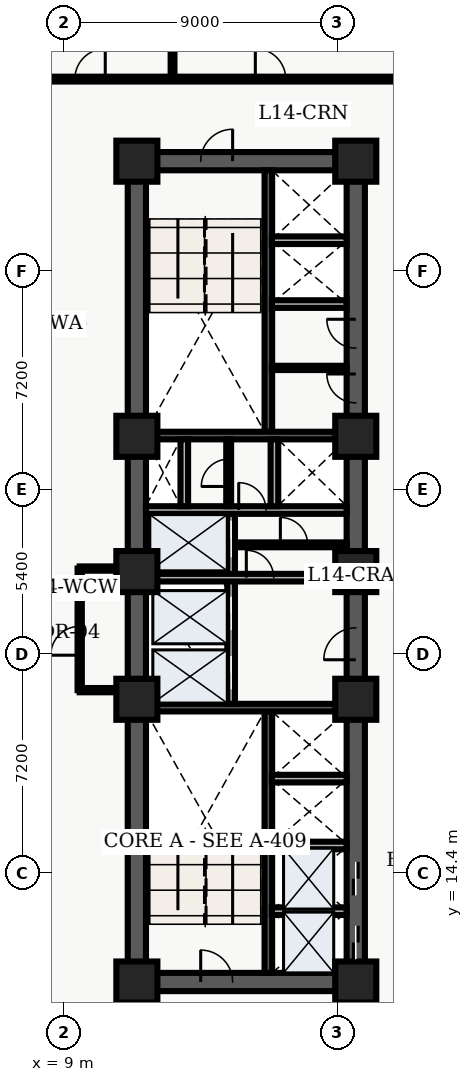
"""IFC4 building model, lengths in metres.
Left out: names, types, materials, properties, quantities, classifications, styles, units other than length and angle.
Written with IfcOpenShell. Run it as: python <this file> out.ifc"""

import sys

from ifc_helpers import new_model, entity, si_unit, converted_unit, direction, frame, origin_with_axes, origin_2d_with_axis, place, context, subcontext, project, spatial, polyline, rectangle, outline, extrude, element, fill, save


model = new_model("IFC4")
c1 = context("Model", 3, precision=1e-05, world=origin_with_axes(), true_north=direction((0.0, 1.0)))
c2 = subcontext(c1, "Body", "Model", "MODEL_VIEW")
j1 = project(units=[si_unit("LENGTHUNIT", "METRE"), converted_unit("PLANEANGLEUNIT", "DEGREE", entity("IfcPlaneAngleMeasure", 0.017), si_unit("PLANEANGLEUNIT", "RADIAN"), dimensions=[0, 0, 0, 0, 0, 0, 0])], contexts=[c1])
p1 = place(None, origin_with_axes())
s1 = spatial("IfcSite", under=j1, at=p1, CompositionType="ELEMENT")
p2 = place(p1, origin_with_axes())
s2 = spatial("IfcBuilding", under=s1, at=p2, CompositionType="ELEMENT")
p3 = place(p2, frame((0.0, 0.0, 60.0), z_axis=(0.0, 0.0, 1.0), x_axis=(1.0, 0.0, 0.0)))
s3 = spatial("IfcBuildingStorey", under=s2, at=p3, CompositionType="ELEMENT", Elevation=60.0)
p4 = place(p3, frame((11.4, 10.8, 0.0), z_axis=(0.0, 0.0, 1.0), x_axis=(0.0, 1.0, 0.0)))
e1 = element("IfcWall", 1, at=p4, inside=s3, PredefinedType="SHEAR", context=c2, shape_type="SweptSolid", body=[
    extrude(outline(polyline([(0.0, -0.3), (27.0, -0.3), (27.0, 0.3), (0.0, 0.3), (0.0, -0.3)])), origin_with_axes(), (0.0, 0.0, 1.0), 3.66),
])
p5 = place(p3, frame((11.4, 10.8, 0.0), z_axis=(0.0, 0.0, 1.0), x_axis=(1.0, 0.0, 0.0)))
e2 = element("IfcWall", 2, at=p5, inside=s3, PredefinedType="SHEAR", context=c2, shape_type="SweptSolid", body=[
    extrude(outline(polyline([(0.0, -0.3), (7.2, -0.3), (7.2, 0.3), (0.0, 0.3), (0.0, -0.3)])), origin_with_axes(), (0.0, 0.0, 1.0), 3.66),
])
p6 = place(p5, frame((2.625, 0.0, 0.0), z_axis=(0.0, 0.0, 1.0), x_axis=(1.0, 0.0, 0.0)))
e3 = element("IfcOpeningElement", 3, at=p6, cuts=e2, PredefinedType="OPENING", context=c2, shape_type="SweptSolid", body=[
    extrude(rectangle(XDim=1.05, YDim=0.62, at=origin_2d_with_axis()), origin_with_axes(), (0.0, 0.0, 1.0), 2.15),
])
p7 = place(p3, frame((11.4, 37.8, 0.0), z_axis=(0.0, 0.0, 1.0), x_axis=(1.0, 0.0, 0.0)))
e4 = element("IfcWall", 4, at=p7, inside=s3, PredefinedType="SHEAR", context=c2, shape_type="SweptSolid", body=[
    extrude(outline(polyline([(0.0, -0.3), (7.2, -0.3), (7.2, 0.3), (0.0, 0.3), (0.0, -0.3)])), origin_with_axes(), (0.0, 0.0, 1.0), 3.66),
])
p8 = place(p7, frame((2.625, 0.0, 0.0), z_axis=(0.0, 0.0, 1.0), x_axis=(1.0, 0.0, 0.0)))
e5 = element("IfcOpeningElement", 5, at=p8, cuts=e4, PredefinedType="OPENING", context=c2, shape_type="SweptSolid", body=[
    extrude(rectangle(XDim=1.05, YDim=0.62, at=origin_2d_with_axis()), origin_with_axes(), (0.0, 0.0, 1.0), 2.15),
])
p9 = place(p3, frame((18.6, 10.8, 0.0), z_axis=(0.0, 0.0, 1.0), x_axis=(0.0, 1.0, 0.0)))
e6 = element("IfcWall", 6, at=p9, inside=s3, PredefinedType="SHEAR", context=c2, shape_type="SweptSolid", body=[
    extrude(outline(polyline([(0.0, -0.3), (13.5, -0.3), (13.5, 0.3), (0.0, 0.3), (0.0, -0.3)])), origin_with_axes(), (0.0, 0.0, 1.0), 3.66),
])
p10 = place(p9, frame((1.3, 0.0, 0.0), z_axis=(0.0, 0.0, 1.0), x_axis=(1.0, 0.0, 0.0)))
e7 = element("IfcOpeningElement", 7, at=p10, cuts=e6, PredefinedType="OPENING", context=c2, shape_type="SweptSolid", body=[
    extrude(rectangle(XDim=1.1, YDim=0.62, at=origin_2d_with_axis()), origin_with_axes(), (0.0, 0.0, 1.0), 2.15),
])
p11 = place(p9, frame((3.4, 0.0, 0.0), z_axis=(0.0, 0.0, 1.0), x_axis=(1.0, 0.0, 0.0)))
e8 = element("IfcOpeningElement", 8, at=p11, cuts=e6, PredefinedType="OPENING", context=c2, shape_type="SweptSolid", body=[
    extrude(rectangle(XDim=1.1, YDim=0.62, at=origin_2d_with_axis()), origin_with_axes(), (0.0, 0.0, 1.0), 2.15),
])
p12 = place(p9, frame((11.125, 0.0, 0.0), z_axis=(0.0, 0.0, 1.0), x_axis=(1.0, 0.0, 0.0)))
e9 = element("IfcOpeningElement", 9, at=p12, cuts=e6, PredefinedType="OPENING", context=c2, shape_type="SweptSolid", body=[
    extrude(rectangle(XDim=1.05, YDim=0.62, at=origin_2d_with_axis()), origin_with_axes(), (0.0, 0.0, 1.0), 2.15),
])
p13 = place(p3, frame((18.6, 24.3, 0.0), z_axis=(0.0, 0.0, 1.0), x_axis=(0.0, 1.0, 0.0)))
e10 = element("IfcWall", 10, at=p13, inside=s3, PredefinedType="SHEAR", context=c2, shape_type="SweptSolid", body=[
    extrude(outline(polyline([(0.0, -0.3), (13.5, -0.3), (13.5, 0.3), (0.0, 0.3), (0.0, -0.3)])), origin_with_axes(), (0.0, 0.0, 1.0), 3.66),
])
p14 = place(p13, frame((6.025, 0.0, 0.0), z_axis=(0.0, 0.0, 1.0), x_axis=(1.0, 0.0, 0.0)))
e11 = element("IfcOpeningElement", 11, at=p14, cuts=e10, PredefinedType="OPENING", context=c2, shape_type="SweptSolid", body=[
    extrude(rectangle(XDim=0.95, YDim=0.62, at=origin_2d_with_axis()), origin_with_axes(), (0.0, 0.0, 1.0), 2.15),
])
p15 = place(p13, frame((7.825, 0.0, 0.0), z_axis=(0.0, 0.0, 1.0), x_axis=(1.0, 0.0, 0.0)))
e12 = element("IfcOpeningElement", 12, at=p15, cuts=e10, PredefinedType="OPENING", context=c2, shape_type="SweptSolid", body=[
    extrude(rectangle(XDim=0.95, YDim=0.62, at=origin_2d_with_axis()), origin_with_axes(), (0.0, 0.0, 1.0), 2.15),
])
p16 = place(p3, frame((15.725, 11.1, 0.0), z_axis=(0.0, 0.0, 1.0), x_axis=(0.0, 1.0, 0.0)))
e13 = element("IfcWall", 13, at=p16, inside=s3, PredefinedType="SHEAR", context=c2, shape_type="SweptSolid", body=[
    extrude(outline(polyline([(0.0, -0.125), (8.6, -0.125), (8.6, 0.125), (0.0, 0.125), (0.0, -0.125)])), origin_with_axes(), (0.0, 0.0, 1.0), 3.66),
])
p17 = place(p3, frame((11.7, 19.825, 0.0), z_axis=(0.0, 0.0, 1.0), x_axis=(1.0, 0.0, 0.0)))
e14 = element("IfcWall", 14, at=p17, inside=s3, PredefinedType="SHEAR", context=c2, shape_type="SweptSolid", body=[
    extrude(outline(polyline([(0.0, -0.125), (6.6, -0.125), (6.6, 0.125), (0.0, 0.125), (0.0, -0.125)])), origin_with_axes(), (0.0, 0.0, 1.0), 3.66),
])
p18 = place(p3, frame((15.725, 28.9, 0.0), z_axis=(0.0, 0.0, 1.0), x_axis=(0.0, 1.0, 0.0)))
e15 = element("IfcWall", 15, at=p18, inside=s3, PredefinedType="SHEAR", context=c2, shape_type="SweptSolid", body=[
    extrude(outline(polyline([(0.0, -0.125), (8.6, -0.125), (8.6, 0.125), (0.0, 0.125), (0.0, -0.125)])), origin_with_axes(), (0.0, 0.0, 1.0), 3.66),
])
p19 = place(p3, frame((11.7, 28.775, 0.0), z_axis=(0.0, 0.0, 1.0), x_axis=(1.0, 0.0, 0.0)))
e16 = element("IfcWall", 16, at=p19, inside=s3, PredefinedType="SHEAR", context=c2, shape_type="SweptSolid", body=[
    extrude(outline(polyline([(0.0, -0.125), (6.6, -0.125), (6.6, 0.125), (0.0, 0.125), (0.0, -0.125)])), origin_with_axes(), (0.0, 0.0, 1.0), 3.66),
])
p20 = place(p3, frame((14.5, 19.95, 0.0), z_axis=(0.0, 0.0, 1.0), x_axis=(0.0, 1.0, 0.0)))
e17 = element("IfcWall", 17, at=p20, inside=s3, PredefinedType="SOLIDWALL", context=c2, shape_type="SweptSolid", body=[
    extrude(outline(polyline([(0.0, -0.125), (6.25, -0.125), (6.25, 0.125), (0.0, 0.125), (0.0, -0.125)])), origin_with_axes(), (0.0, 0.0, 1.0), 2.7),
])
p21 = place(p20, frame((1.025, 0.0, 0.0), z_axis=(0.0, 0.0, 1.0), x_axis=(1.0, 0.0, 0.0)))
e18 = element("IfcOpeningElement", 18, at=p21, cuts=e17, PredefinedType="OPENING", context=c2, shape_type="SweptSolid", body=[
    extrude(rectangle(XDim=1.1, YDim=0.27, at=origin_2d_with_axis()), origin_with_axes(), (0.0, 0.0, 1.0), 2.15),
])
p22 = place(p20, frame((2.975, 0.0, 0.0), z_axis=(0.0, 0.0, 1.0), x_axis=(1.0, 0.0, 0.0)))
e19 = element("IfcOpeningElement", 19, at=p22, cuts=e17, PredefinedType="OPENING", context=c2, shape_type="SweptSolid", body=[
    extrude(rectangle(XDim=1.1, YDim=0.27, at=origin_2d_with_axis()), origin_with_axes(), (0.0, 0.0, 1.0), 2.15),
])
p23 = place(p20, frame((5.425, 0.0, 0.0), z_axis=(0.0, 0.0, 1.0), x_axis=(1.0, 0.0, 0.0)))
e20 = element("IfcOpeningElement", 20, at=p23, cuts=e17, PredefinedType="OPENING", context=c2, shape_type="SweptSolid", body=[
    extrude(rectangle(XDim=1.2, YDim=0.27, at=origin_2d_with_axis()), origin_with_axes(), (0.0, 0.0, 1.0), 2.15),
])
p24 = place(p3, frame((11.7, 24.1, 0.0), z_axis=(0.0, 0.0, 1.0), x_axis=(1.0, 0.0, 0.0)))
e21 = element("IfcWall", 21, at=p24, inside=s3, PredefinedType="SOLIDWALL", context=c2, shape_type="SweptSolid", body=[
    extrude(outline(polyline([(0.0, -0.125), (6.6, -0.125), (6.6, 0.125), (0.0, 0.125), (0.0, -0.125)])), origin_with_axes(), (0.0, 0.0, 1.0), 2.7),
])
p25 = place(p24, frame((3.75, 0.0, 0.0), z_axis=(0.0, 0.0, 1.0), x_axis=(1.0, 0.0, 0.0)))
e22 = element("IfcOpeningElement", 22, at=p25, cuts=e21, PredefinedType="OPENING", context=c2, shape_type="SweptSolid", body=[
    extrude(rectangle(XDim=0.9, YDim=0.27, at=origin_2d_with_axis()), origin_with_axes(), (0.0, 0.0, 1.0), 2.15),
])
p26 = place(p3, frame((11.7, 26.325, 0.0), z_axis=(0.0, 0.0, 1.0), x_axis=(1.0, 0.0, 0.0)))
e23 = element("IfcWall", 23, at=p26, inside=s3, PredefinedType="SOLIDWALL", context=c2, shape_type="SweptSolid", body=[
    extrude(outline(polyline([(0.0, -0.125), (6.6, -0.125), (6.6, 0.125), (0.0, 0.125), (0.0, -0.125)])), origin_with_axes(), (0.0, 0.0, 1.0), 2.7),
])
p27 = place(p26, frame((3.5, 0.0, 0.0), z_axis=(0.0, 0.0, 1.0), x_axis=(1.0, 0.0, 0.0)))
e24 = element("IfcOpeningElement", 24, at=p27, cuts=e23, PredefinedType="OPENING", context=c2, shape_type="SweptSolid", body=[
    extrude(rectangle(XDim=0.9, YDim=0.27, at=origin_2d_with_axis()), origin_with_axes(), (0.0, 0.0, 1.0), 2.15),
])
for number, where, z_axis, x_axis in (
    (25, (12.96, 26.45, 0.0), (0.0, 0.0, 1.0), (0.0, 1.0, 0.0)),
    (26, (15.925, 26.45, 0.0), (0.0, 0.0, 1.0), (0.0, 1.0, 0.0)),
):
    element("IfcWall", number, at=place(p3, frame(where, z_axis=z_axis, x_axis=x_axis)), inside=s3, PredefinedType="SOLIDWALL", context=c2, shape_type="SweptSolid", body=[
        extrude(outline(polyline([(0.0, -0.125), (2.2, -0.125), (2.2, 0.125), (0.0, 0.125), (0.0, -0.125)])), origin_with_axes(), (0.0, 0.0, 1.0), 2.7),
    ])
for number, where, z_axis, x_axis in (
    (27, (11.4, 10.8, 0.0), (0.0, 0.0, 1.0), (1.0, 0.0, 0.0)),
    (28, (11.4, 20.1, 0.0), (0.0, 0.0, 1.0), (1.0, 0.0, 0.0)),
    (29, (11.4, 24.3, 0.0), (0.0, 0.0, 1.0), (1.0, 0.0, 0.0)),
    (30, (11.4, 28.75, 0.0), (0.0, 0.0, 1.0), (1.0, 0.0, 0.0)),
    (31, (11.4, 37.8, 0.0), (0.0, 0.0, 1.0), (1.0, 0.0, 0.0)),
    (32, (18.6, 10.8, 0.0), (0.0, 0.0, 1.0), (1.0, 0.0, 0.0)),
    (33, (18.6, 20.1, 0.0), (0.0, 0.0, 1.0), (1.0, 0.0, 0.0)),
    (34, (18.6, 24.3, 0.0), (0.0, 0.0, 1.0), (1.0, 0.0, 0.0)),
    (35, (18.6, 28.75, 0.0), (0.0, 0.0, 1.0), (1.0, 0.0, 0.0)),
    (36, (18.6, 37.8, 0.0), (0.0, 0.0, 1.0), (1.0, 0.0, 0.0)),
):
    element("IfcColumn", number, at=place(p3, frame(where, z_axis=z_axis, x_axis=x_axis)), inside=s3, PredefinedType="COLUMN", context=c2, shape_type="SweptSolid", body=[
        extrude(rectangle(XDim=1.35, YDim=1.35, at=origin_2d_with_axis()), origin_with_axes(), (0.0, 0.0, 1.0), 3.9),
    ])
p28 = place(p3, frame((14.62, 25.18, 0.0), z_axis=(0.0, 0.0, 1.0), x_axis=(1.0, 0.0, 0.0)))
e37 = element("IfcWall", 37, at=p28, inside=s3, PredefinedType="PARTITIONING", context=c2, shape_type="SweptSolid", body=[
    extrude(outline(polyline([(0.0, -0.08), (3.68, -0.08), (3.68, 0.08), (0.0, 0.08), (0.0, -0.08)])), origin_with_axes(), (0.0, 0.0, 1.0), 2.7),
])
p29 = place(p28, frame((1.95, 0.0, 0.0), z_axis=(0.0, 0.0, 1.0), x_axis=(1.0, 0.0, 0.0)))
e38 = element("IfcOpeningElement", 38, at=p29, cuts=e37, PredefinedType="OPENING", context=c2, shape_type="SweptSolid", body=[
    extrude(rectangle(XDim=0.9, YDim=0.18, at=origin_2d_with_axis()), origin_with_axes(), (0.0, 0.0, 1.0), 2.15),
])
p30 = place(p3, frame((14.42, 26.45, 0.0), z_axis=(0.0, 0.0, 1.0), x_axis=(0.0, 1.0, 0.0)))
e39 = element("IfcWall", 39, at=p30, inside=s3, PredefinedType="PARTITIONING", context=c2, shape_type="SweptSolid", body=[
    extrude(outline(polyline([(0.0, -0.08), (2.2, -0.08), (2.2, 0.08), (0.0, 0.08), (0.0, -0.08)])), origin_with_axes(), (0.0, 0.0, 1.0), 2.7),
])
p31 = place(p30, frame((1.1, 0.0, 0.0), z_axis=(0.0, 0.0, 1.0), x_axis=(1.0, 0.0, 0.0)))
e40 = element("IfcOpeningElement", 40, at=p31, cuts=e39, PredefinedType="OPENING", context=c2, shape_type="SweptSolid", body=[
    extrude(rectangle(XDim=0.9, YDim=0.18, at=origin_2d_with_axis()), origin_with_axes(), (0.0, 0.0, 1.0), 2.15),
])
for number, where, z_axis, x_axis in (
    (41, (15.84, 13.13, 0.0), (0.0, 0.0, 1.0), (1.0, 0.0, 0.0)),
    (42, (15.84, 15.29, 0.0), (0.0, 0.0, 1.0), (1.0, 0.0, 0.0)),
    (43, (15.84, 17.49, 0.0), (0.0, 0.0, 1.0), (1.0, 0.0, 0.0)),
    (44, (15.84, 33.1, 0.0), (0.0, 0.0, 1.0), (1.0, 0.0, 0.0)),
    (45, (15.84, 35.2, 0.0), (0.0, 0.0, 1.0), (1.0, 0.0, 0.0)),
):
    element("IfcWall", number, at=place(p3, frame(where, z_axis=z_axis, x_axis=x_axis)), inside=s3, PredefinedType="SOLIDWALL", context=c2, shape_type="SweptSolid", body=[
        extrude(outline(polyline([(0.0, -0.125), (2.46, -0.125), (2.46, 0.125), (0.0, 0.125), (0.0, -0.125)])), origin_with_axes(), (0.0, 0.0, 1.0), 2.7),
    ])
p32 = place(p3, frame((15.84, 31.0, 0.0), z_axis=(0.0, 0.0, 1.0), x_axis=(1.0, 0.0, 0.0)))
e46 = element("IfcWall", 46, at=p32, inside=s3, PredefinedType="PARTITIONING", context=c2, shape_type="SweptSolid", body=[
    extrude(outline(polyline([(0.0, -0.07), (2.46, -0.07), (2.46, 0.07), (0.0, 0.07), (0.0, -0.07)])), origin_with_axes(), (0.0, 0.0, 1.0), 2.7),
])
p33 = place(p3, frame((9.52, 20.4, 0.0), z_axis=(0.0, 0.0, 1.0), x_axis=(0.0, 1.0, 0.0)))
e47 = element("IfcWall", 47, at=p33, inside=s3, PredefinedType="PARTITIONING", context=c2, shape_type="SweptSolid", body=[
    extrude(outline(polyline([(0.0, -0.07), (4.0, -0.07), (4.0, 0.07), (0.0, 0.07), (0.0, -0.07)])), origin_with_axes(), (0.0, 0.0, 1.0), 2.7),
])
p34 = place(p33, frame((1.625, 0.0, 0.0), z_axis=(0.0, 0.0, 1.0), x_axis=(1.0, 0.0, 0.0)))
e48 = element("IfcOpeningElement", 48, at=p34, cuts=e47, PredefinedType="OPENING", context=c2, shape_type="SweptSolid", body=[
    extrude(rectangle(XDim=0.95, YDim=0.16, at=origin_2d_with_axis()), origin_with_axes(), (0.0, 0.0, 1.0), 2.15),
])
for number, where, z_axis, x_axis in (
    (49, (9.52, 20.4, 0.0), (0.0, 0.0, 1.0), (1.0, 0.0, 0.0)),
    (50, (9.52, 24.4, 0.0), (0.0, 0.0, 1.0), (1.0, 0.0, 0.0)),
):
    element("IfcWall", number, at=place(p3, frame(where, z_axis=z_axis, x_axis=x_axis)), inside=s3, PredefinedType="PARTITIONING", context=c2, shape_type="SweptSolid", body=[
        extrude(outline(polyline([(0.0, -0.07), (1.58, -0.07), (1.58, 0.07), (0.0, 0.07), (0.0, -0.07)])), origin_with_axes(), (0.0, 0.0, 1.0), 2.7),
    ])
p35 = place(p3, frame((2.6, 40.5, 0.0), z_axis=(0.0, 0.0, 1.0), x_axis=(1.0, 0.0, 0.0)))
e51 = element("IfcWall", 51, at=p35, inside=s3, PredefinedType="PARTITIONING", context=c2, shape_type="SweptSolid", body=[
    extrude(outline(polyline([(0.0, -0.08), (18.65, -0.08), (18.65, 0.08), (0.0, 0.08), (0.0, -0.08)])), origin_with_axes(), (0.0, 0.0, 1.0), 2.7),
])
p36 = place(p35, frame((2.268, 0.0, 0.0), z_axis=(0.0, 0.0, 1.0), x_axis=(1.0, 0.0, 0.0)))
e52 = element("IfcOpeningElement", 52, at=p36, cuts=e51, PredefinedType="OPENING", context=c2, shape_type="SweptSolid", body=[
    extrude(rectangle(XDim=1.0, YDim=0.18, at=origin_2d_with_axis()), origin_with_axes(), (0.0, 0.0, 1.0), 2.15),
])
p37 = place(p35, frame((7.261, 0.0, 0.0), z_axis=(0.0, 0.0, 1.0), x_axis=(1.0, 0.0, 0.0)))
e53 = element("IfcOpeningElement", 53, at=p37, cuts=e51, PredefinedType="OPENING", context=c2, shape_type="SweptSolid", body=[
    extrude(rectangle(XDim=1.0, YDim=0.18, at=origin_2d_with_axis()), origin_with_axes(), (0.0, 0.0, 1.0), 2.15),
])
p38 = place(p35, frame((13.197, 0.0, 0.0), z_axis=(0.0, 0.0, 1.0), x_axis=(1.0, 0.0, 0.0)))
e54 = element("IfcOpeningElement", 54, at=p38, cuts=e51, PredefinedType="OPENING", context=c2, shape_type="SweptSolid", body=[
    extrude(rectangle(XDim=1.0, YDim=0.18, at=origin_2d_with_axis()), origin_with_axes(), (0.0, 0.0, 1.0), 2.15),
])
p39 = place(p3, frame((12.574, 40.6, 0.0), z_axis=(0.0, 0.0, 1.0), x_axis=(0.0, 1.0, 0.0)))
e55 = element("IfcWall", 55, at=p39, inside=s3, PredefinedType="PARTITIONING", context=c2, shape_type="SweptSolid", body=[
    extrude(outline(polyline([(0.0, -0.062), (7.64, -0.062), (7.64, 0.062), (0.0, 0.062), (0.0, -0.062)])), origin_with_axes(), (0.0, 0.0, 1.0), 2.7),
])
p40 = place(p9, frame((1.3, 0.0, 0.0), z_axis=(0.0, 0.0, 1.0), x_axis=(1.0, 0.0, 0.0)))
e56 = element("IfcDoor", 56, at=p40, inside=s3, OperationType="SLIDING_TO_LEFT", PredefinedType="DOOR", context=c2, shape_type="SweptSolid", body=[
    extrude(rectangle(XDim=1.1, YDim=0.09, at=origin_2d_with_axis()), origin_with_axes(), (0.0, 0.0, 1.0), 2.15),
])
fill(e7, e56)
p41 = place(p9, frame((3.4, 0.0, 0.0), z_axis=(0.0, 0.0, 1.0), x_axis=(1.0, 0.0, 0.0)))
e57 = element("IfcDoor", 57, at=p41, inside=s3, OperationType="SLIDING_TO_RIGHT", PredefinedType="DOOR", context=c2, shape_type="SweptSolid", body=[
    extrude(rectangle(XDim=1.1, YDim=0.09, at=origin_2d_with_axis()), origin_with_axes(), (0.0, 0.0, 1.0), 2.15),
])
fill(e8, e57)
p42 = place(p20, frame((1.025, 0.0, 0.0), z_axis=(0.0, 0.0, 1.0), x_axis=(1.0, 0.0, 0.0)))
e58 = element("IfcDoor", 58, at=p42, inside=s3, OperationType="SLIDING_TO_LEFT", PredefinedType="DOOR", context=c2, shape_type="SweptSolid", body=[
    extrude(rectangle(XDim=1.1, YDim=0.09, at=origin_2d_with_axis()), origin_with_axes(), (0.0, 0.0, 1.0), 2.15),
])
fill(e18, e58)
p43 = place(p20, frame((2.975, 0.0, 0.0), z_axis=(0.0, 0.0, 1.0), x_axis=(1.0, 0.0, 0.0)))
e59 = element("IfcDoor", 59, at=p43, inside=s3, OperationType="SLIDING_TO_RIGHT", PredefinedType="DOOR", context=c2, shape_type="SweptSolid", body=[
    extrude(rectangle(XDim=1.1, YDim=0.09, at=origin_2d_with_axis()), origin_with_axes(), (0.0, 0.0, 1.0), 2.15),
])
fill(e19, e59)
p44 = place(p20, frame((5.425, 0.0, 0.0), z_axis=(0.0, 0.0, 1.0), x_axis=(1.0, 0.0, 0.0)))
e60 = element("IfcDoor", 60, at=p44, inside=s3, OperationType="DOUBLE_DOOR_SLIDING", PredefinedType="DOOR", context=c2, shape_type="SweptSolid", body=[
    extrude(rectangle(XDim=1.2, YDim=0.09, at=origin_2d_with_axis()), origin_with_axes(), (0.0, 0.0, 1.0), 2.15),
])
fill(e20, e60)
p45 = place(p5, frame((2.625, 0.0, 0.0), z_axis=(0.0, 0.0, 1.0), x_axis=(1.0, 0.0, 0.0)))
e61 = element("IfcDoor", 61, at=p45, inside=s3, OperationType="SINGLE_SWING_LEFT", PredefinedType="DOOR", context=c2, shape_type="SweptSolid", body=[
    extrude(rectangle(XDim=1.05, YDim=0.09, at=origin_2d_with_axis()), origin_with_axes(), (0.0, 0.0, 1.0), 2.15),
])
fill(e3, e61)
p46 = place(p7, frame((2.625, 0.0, 0.0), z_axis=(0.0, 0.0, 1.0), x_axis=(1.0, 0.0, 0.0)))
e62 = element("IfcDoor", 62, at=p46, inside=s3, OperationType="SINGLE_SWING_RIGHT", PredefinedType="DOOR", context=c2, shape_type="SweptSolid", body=[
    extrude(rectangle(XDim=1.05, YDim=0.09, at=origin_2d_with_axis()), origin_with_axes(), (0.0, 0.0, 1.0), 2.15),
])
fill(e5, e62)
p47 = place(p9, frame((11.125, 0.0, 0.0), z_axis=(0.0, 0.0, 1.0), x_axis=(1.0, 0.0, 0.0)))
e63 = element("IfcDoor", 63, at=p47, inside=s3, OperationType="SINGLE_SWING_LEFT", PredefinedType="DOOR", context=c2, shape_type="SweptSolid", body=[
    extrude(rectangle(XDim=1.05, YDim=0.09, at=origin_2d_with_axis()), origin_with_axes(), (0.0, 0.0, 1.0), 2.15),
])
fill(e9, e63)
p48 = place(p26, frame((3.5, 0.0, 0.0), z_axis=(0.0, 0.0, 1.0), x_axis=(1.0, 0.0, 0.0)))
e64 = element("IfcDoor", 64, at=p48, inside=s3, OperationType="SINGLE_SWING_LEFT", PredefinedType="DOOR", context=c2, shape_type="SweptSolid", body=[
    extrude(rectangle(XDim=0.9, YDim=0.09, at=origin_2d_with_axis()), origin_with_axes(), (0.0, 0.0, 1.0), 2.15),
])
fill(e24, e64)
p49 = place(p30, frame((1.1, 0.0, 0.0), z_axis=(0.0, 0.0, 1.0), x_axis=(1.0, 0.0, 0.0)))
e65 = element("IfcDoor", 65, at=p49, inside=s3, OperationType="SINGLE_SWING_LEFT", PredefinedType="DOOR", context=c2, shape_type="SweptSolid", body=[
    extrude(rectangle(XDim=0.9, YDim=0.09, at=origin_2d_with_axis()), origin_with_axes(), (0.0, 0.0, 1.0), 2.15),
])
fill(e40, e65)
p50 = place(p24, frame((3.75, 0.0, 0.0), z_axis=(0.0, 0.0, 1.0), x_axis=(1.0, 0.0, 0.0)))
e66 = element("IfcDoor", 66, at=p50, inside=s3, OperationType="SINGLE_SWING_LEFT", PredefinedType="DOOR", context=c2, shape_type="SweptSolid", body=[
    extrude(rectangle(XDim=0.9, YDim=0.09, at=origin_2d_with_axis()), origin_with_axes(), (0.0, 0.0, 1.0), 2.15),
])
fill(e22, e66)
p51 = place(p28, frame((1.95, 0.0, 0.0), z_axis=(0.0, 0.0, 1.0), x_axis=(1.0, 0.0, 0.0)))
e67 = element("IfcDoor", 67, at=p51, inside=s3, OperationType="SINGLE_SWING_LEFT", PredefinedType="DOOR", context=c2, shape_type="SweptSolid", body=[
    extrude(rectangle(XDim=0.9, YDim=0.09, at=origin_2d_with_axis()), origin_with_axes(), (0.0, 0.0, 1.0), 2.15),
])
fill(e38, e67)
p52 = place(p13, frame((6.025, 0.0, 0.0), z_axis=(0.0, 0.0, 1.0), x_axis=(1.0, 0.0, 0.0)))
e68 = element("IfcDoor", 68, at=p52, inside=s3, OperationType="SINGLE_SWING_RIGHT", PredefinedType="DOOR", context=c2, shape_type="SweptSolid", body=[
    extrude(rectangle(XDim=0.95, YDim=0.09, at=origin_2d_with_axis()), origin_with_axes(), (0.0, 0.0, 1.0), 2.15),
])
fill(e11, e68)
p53 = place(p13, frame((7.825, 0.0, 0.0), z_axis=(0.0, 0.0, 1.0), x_axis=(1.0, 0.0, 0.0)))
e69 = element("IfcDoor", 69, at=p53, inside=s3, OperationType="SINGLE_SWING_RIGHT", PredefinedType="DOOR", context=c2, shape_type="SweptSolid", body=[
    extrude(rectangle(XDim=0.95, YDim=0.09, at=origin_2d_with_axis()), origin_with_axes(), (0.0, 0.0, 1.0), 2.15),
])
fill(e12, e69)
p54 = place(p33, frame((1.625, 0.0, 0.0), z_axis=(0.0, 0.0, 1.0), x_axis=(1.0, 0.0, 0.0)))
e70 = element("IfcDoor", 70, at=p54, inside=s3, OperationType="SINGLE_SWING_LEFT", PredefinedType="DOOR", context=c2, shape_type="SweptSolid", body=[
    extrude(rectangle(XDim=0.95, YDim=0.084, at=origin_2d_with_axis()), origin_with_axes(), (0.0, 0.0, 1.0), 2.15),
])
fill(e48, e70)
p55 = place(p35, frame((7.261, 0.0, 0.0), z_axis=(0.0, 0.0, 1.0), x_axis=(1.0, 0.0, 0.0)))
e71 = element("IfcDoor", 71, at=p55, inside=s3, OperationType="SINGLE_SWING_RIGHT", PredefinedType="DOOR", context=c2, shape_type="SweptSolid", body=[
    extrude(rectangle(XDim=1.0, YDim=0.09, at=origin_2d_with_axis()), origin_with_axes(), (0.0, 0.0, 1.0), 2.15),
])
fill(e53, e71)
p56 = place(p35, frame((13.197, 0.0, 0.0), z_axis=(0.0, 0.0, 1.0), x_axis=(1.0, 0.0, 0.0)))
e72 = element("IfcDoor", 72, at=p56, inside=s3, OperationType="SINGLE_SWING_LEFT", PredefinedType="DOOR", context=c2, shape_type="SweptSolid", body=[
    extrude(rectangle(XDim=1.0, YDim=0.09, at=origin_2d_with_axis()), origin_with_axes(), (0.0, 0.0, 1.0), 2.15),
])
fill(e54, e72)
save(model, sys.argv[1])
